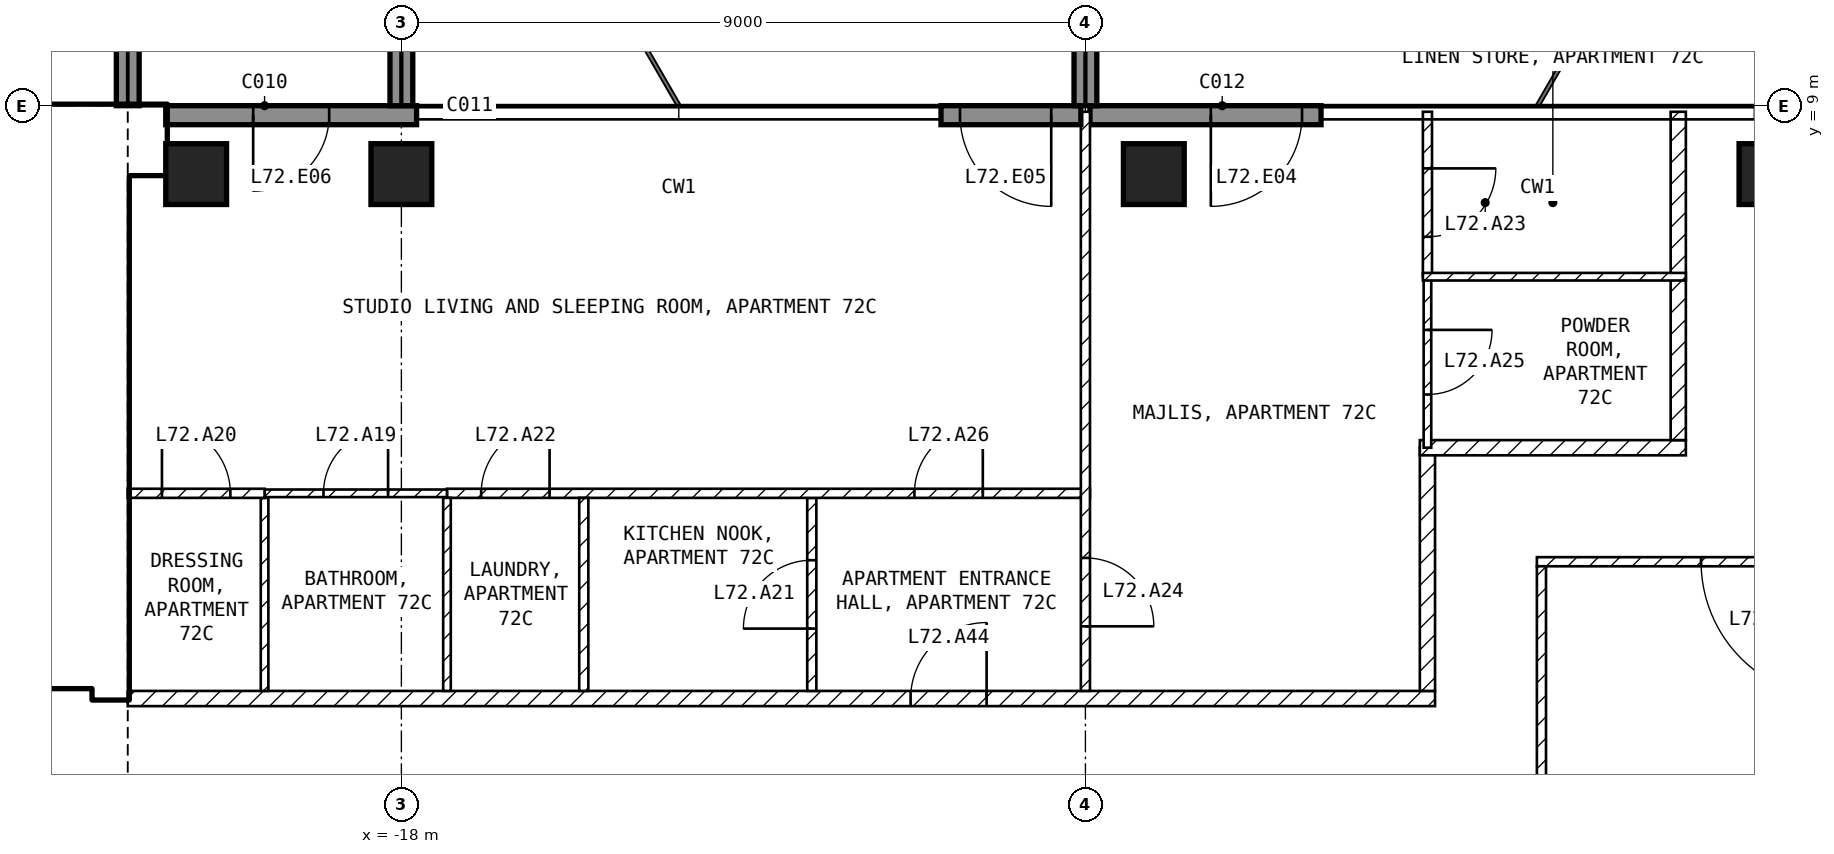
"""IFC4 building model, lengths in metres.
Left out: names, types, materials, properties, quantities, classifications, styles, units other than length and angle.
Written with IfcOpenShell. Run it as: python <this file> out.ifc"""

import sys

from ifc_helpers import new_model, si_unit, direction, frame, frame_2d, origin, origin_2d, place, context, subcontext, project, spatial, rectangle, extrude, element, fill, save


model = new_model("IFC4")
c1 = context("Model", 3, precision=1e-05, world=origin(), true_north=direction((0.0, 1.0)))
c2 = subcontext(c1, "Body", "Model", "MODEL_VIEW")
j1 = project(units=[si_unit("LENGTHUNIT", "METRE"), si_unit("PLANEANGLEUNIT", "RADIAN")], contexts=[c1])
p1 = place(None, origin())
s1 = spatial("IfcSite", under=j1, at=p1, CompositionType="ELEMENT")
p2 = place(p1, origin())
s2 = spatial("IfcBuilding", under=s1, at=p2, CompositionType="ELEMENT")
p3 = place(p2, frame((0.0, 0.0, 281.5)))
s3 = spatial("IfcBuildingStorey", under=s2, at=p3, CompositionType="ELEMENT", Elevation=281.5)
for number, where, z_axis, x_axis in (
    (1, (-20.7, 8.1, -0.25), (0.0, 0.0, 1.0), (1.0, 0.0, 0.0)),
    (2, (-18.0, 8.1, -0.25), (0.0, 0.0, 1.0), (1.0, 0.0, 0.0)),
    (3, (-8.1, 8.1, -0.25), (0.0, 0.0, 1.0), (1.0, 0.0, 0.0)),
    (4, (0.0, 8.1, -0.25), (0.0, 0.0, 1.0), (1.0, 0.0, 0.0)),
):
    element("IfcColumn", number, at=place(p3, frame(where, z_axis=z_axis, x_axis=x_axis)), inside=s3, PredefinedType="COLUMN", context=c2, shape_type="SweptSolid", body=[
        extrude(rectangle(XDim=0.8, YDim=0.8, at=origin_2d()), origin(), (0.0, 0.0, 1.0), 3.45),
    ])
p4 = place(p3, frame((-5.9, 8.875, 0.0), z_axis=(0.0, 0.0, 1.0), x_axis=(-1.0, 0.0, 0.0)))
e5 = element("IfcWall", 5, at=p4, inside=s3, PredefinedType="SOLIDWALL", context=c2, shape_type="SweptSolid", body=[
    extrude(rectangle(XDim=3.04, YDim=0.25, at=frame_2d((1.52, 0.0))), origin(), (0.0, 0.0, 1.0), 3.2),
])
p5 = place(p4, frame((0.25, 0.0, 0.0)))
e6 = element("IfcOpeningElement", 6, at=p5, cuts=e5, PredefinedType="OPENING", context=c2, shape_type="SweptSolid", body=[
    extrude(rectangle(XDim=1.2, YDim=2.4, at=frame_2d((0.6, 1.2))), frame((0.0, 0.135, 0.0), z_axis=(0.0, -1.0, 0.0), x_axis=(1.0, 0.0, 0.0)), (0.0, 0.0, 1.0), 0.27),
])
p6 = place(p3, frame((-9.06, 8.875, 0.0), z_axis=(0.0, 0.0, 1.0), x_axis=(-1.0, 0.0, 0.0)))
e7 = element("IfcWall", 7, at=p6, inside=s3, PredefinedType="SOLIDWALL", context=c2, shape_type="SweptSolid", body=[
    extrude(rectangle(XDim=1.84, YDim=0.25, at=frame_2d((0.92, 0.0))), origin(), (0.0, 0.0, 1.0), 3.2),
])
p7 = place(p6, frame((0.39, 0.0, 0.0)))
e8 = element("IfcOpeningElement", 8, at=p7, cuts=e7, PredefinedType="OPENING", context=c2, shape_type="SweptSolid", body=[
    extrude(rectangle(XDim=1.2, YDim=2.4, at=frame_2d((0.6, 1.2))), frame((0.0, 0.135, 0.0), z_axis=(0.0, -1.0, 0.0), x_axis=(1.0, 0.0, 0.0)), (0.0, 0.0, 1.0), 0.27),
])
p8 = place(p3, frame((-17.8, 8.875, 0.0), z_axis=(0.0, 0.0, 1.0), x_axis=(-1.0, 0.0, 0.0)))
e9 = element("IfcWall", 9, at=p8, inside=s3, PredefinedType="SOLIDWALL", context=c2, shape_type="SweptSolid", body=[
    extrude(rectangle(XDim=3.3, YDim=0.25, at=frame_2d((1.65, 0.0))), origin(), (0.0, 0.0, 1.0), 3.2),
])
p9 = place(p8, frame((1.15, 0.0, 0.0)))
e10 = element("IfcOpeningElement", 10, at=p9, cuts=e9, PredefinedType="OPENING", context=c2, shape_type="SweptSolid", body=[
    extrude(rectangle(XDim=1.0, YDim=2.4, at=frame_2d((0.5, 1.2))), frame((0.0, 0.135, 0.0), z_axis=(0.0, -1.0, 0.0), x_axis=(1.0, 0.0, 0.0)), (0.0, 0.0, 1.0), 0.27),
])
for number, where, z_axis, x_axis in (
    (11, (-21.6, 9.0, 0.0), (0.0, 0.0, 1.0), (0.0, 1.0, 0.0)),
    (12, (-18.0, 9.0, 0.0), (0.0, 0.0, 1.0), (0.0, 1.0, 0.0)),
    (13, (-9.0, 9.0, 0.0), (0.0, 0.0, 1.0), (0.0, 1.0, 0.0)),
):
    element("IfcWall", number, at=place(p3, frame(where, z_axis=z_axis, x_axis=x_axis)), inside=s3, PredefinedType="SOLIDWALL", context=c2, shape_type="SweptSolid", body=[
        extrude(rectangle(XDim=2.7, YDim=0.3, at=frame_2d((1.35, 0.0))), origin(), (0.0, 0.0, 1.0), 3.2),
    ])
p10 = place(p3, frame((-29.75, 8.55, 0.0), z_axis=(0.0, 0.0, 1.0), x_axis=(1.0, 0.0, 0.0)))
e14 = element("IfcWall", 14, at=p10, inside=s3, PredefinedType="SHEAR", context=c2, shape_type="SweptSolid", body=[
    extrude(rectangle(XDim=8.65, YDim=0.9, at=frame_2d((4.325, 0.0))), origin(), (0.0, 0.0, 1.0), 3.2),
])
p11 = place(p3, frame((-21.825, 1.2, 0.0), z_axis=(0.0, 0.0, 1.0), x_axis=(0.0, 1.0, 0.0)))
e15 = element("IfcWall", 15, at=p11, inside=s3, PredefinedType="SHEAR", context=c2, shape_type="SweptSolid", body=[
    extrude(rectangle(XDim=6.9, YDim=0.45, at=frame_2d((3.45, 0.0))), origin(), (0.0, 0.0, 1.0), 3.2),
])
p12 = place(p3, frame((-33.35, 1.45, 0.0), z_axis=(0.0, 0.0, 1.0), x_axis=(1.0, 0.0, 0.0)))
e16 = element("IfcWall", 16, at=p12, inside=s3, PredefinedType="SOLIDWALL", context=c2, shape_type="SweptSolid", body=[
    extrude(rectangle(XDim=11.3, YDim=0.2, at=frame_2d((5.65, 0.0))), origin(), (0.0, 0.0, 1.0), 3.2),
])
p13 = place(p12, frame((9.55, 0.0, 0.0)))
e17 = element("IfcOpeningElement", 17, at=p13, cuts=e16, PredefinedType="OPENING", context=c2, shape_type="SweptSolid", body=[
    extrude(rectangle(XDim=1.0, YDim=2.1, at=frame_2d((0.5, 1.05))), frame((0.0, 0.11, 0.0), z_axis=(0.0, -1.0, 0.0), x_axis=(1.0, 0.0, 0.0)), (0.0, 0.0, 1.0), 0.22),
])
p14 = place(p12, frame((7.05, 0.0, 0.0)))
e18 = element("IfcOpeningElement", 18, at=p14, cuts=e16, PredefinedType="OPENING", context=c2, shape_type="SweptSolid", body=[
    extrude(rectangle(XDim=1.0, YDim=2.1, at=frame_2d((0.5, 1.05))), frame((0.0, 0.11, 0.0), z_axis=(0.0, -1.0, 0.0), x_axis=(1.0, 0.0, 0.0)), (0.0, 0.0, 1.0), 0.22),
])
p15 = place(p12, frame((1.175, 0.0, 0.0)))
e19 = element("IfcOpeningElement", 19, at=p15, cuts=e16, PredefinedType="OPENING", context=c2, shape_type="SweptSolid", body=[
    extrude(rectangle(XDim=0.9, YDim=2.1, at=frame_2d((0.45, 1.05))), frame((0.0, 0.11, 0.0), z_axis=(0.0, -1.0, 0.0), x_axis=(1.0, 0.0, 0.0)), (0.0, 0.0, 1.0), 0.22),
])
p16 = place(p3, frame((-28.35, 5.15, 0.0), z_axis=(0.0, 0.0, 1.0), x_axis=(1.0, 0.0, 0.0)))
e20 = element("IfcWall", 20, at=p16, inside=s3, PredefinedType="SOLIDWALL", context=c2, shape_type="SweptSolid", body=[
    extrude(rectangle(XDim=6.3, YDim=0.2, at=frame_2d((3.15, 0.0))), origin(), (0.0, 0.0, 1.0), 3.2),
])
p17 = place(p16, frame((5.1, 0.0, 0.0)))
e21 = element("IfcOpeningElement", 21, at=p17, cuts=e20, PredefinedType="OPENING", context=c2, shape_type="SweptSolid", body=[
    extrude(rectangle(XDim=1.0, YDim=2.1, at=frame_2d((0.5, 1.05))), frame((0.0, 0.11, 0.0), z_axis=(0.0, -1.0, 0.0), x_axis=(1.0, 0.0, 0.0)), (0.0, 0.0, 1.0), 0.22),
])
p18 = place(p3, frame((3.06, 3.0, 0.0), z_axis=(0.0, 0.0, 1.0), x_axis=(-1.0, 0.0, 0.0)))
e22 = element("IfcWall", 22, at=p18, inside=s3, PredefinedType="PARTITIONING", context=c2, shape_type="SweptSolid", body=[
    extrude(rectangle(XDim=6.12, YDim=0.12, at=frame_2d((3.06, 0.0))), origin(), (0.0, 0.0, 1.0), 3.2),
])
p19 = place(p18, frame((2.16, 0.0, 0.0)))
e23 = element("IfcOpeningElement", 23, at=p19, cuts=e22, PredefinedType="OPENING", context=c2, shape_type="SweptSolid", body=[
    extrude(rectangle(XDim=1.8, YDim=2.1, at=frame_2d((0.9, 1.05))), frame((0.0, 0.07, 0.0), z_axis=(0.0, -1.0, 0.0), x_axis=(1.0, 0.0, 0.0)), (0.0, 0.0, 1.0), 0.14),
])
p20 = place(p3, frame((-3.0, 2.94, 0.0), z_axis=(0.0, 0.0, 1.0), x_axis=(0.0, -1.0, 0.0)))
e24 = element("IfcWall", 24, at=p20, inside=s3, PredefinedType="PARTITIONING", context=c2, shape_type="SweptSolid", body=[
    extrude(rectangle(XDim=5.88, YDim=0.12, at=frame_2d((2.94, 0.0))), origin(), (0.0, 0.0, 1.0), 3.2),
])
p21 = place(p3, frame((-21.6, 1.2, 0.0), z_axis=(0.0, 0.0, 1.0), x_axis=(1.0, 0.0, 0.0)))
e25 = element("IfcWall", 25, at=p21, inside=s3, PredefinedType="PARTITIONING", context=c2, shape_type="SweptSolid", body=[
    extrude(rectangle(XDim=17.2, YDim=0.2, at=frame_2d((8.6, 0.0))), origin(), (0.0, 0.0, 1.0), 3.2),
])
p22 = place(p21, frame((10.3, 0.0, 0.0)))
e26 = element("IfcOpeningElement", 26, at=p22, cuts=e25, PredefinedType="OPENING", context=c2, shape_type="SweptSolid", body=[
    extrude(rectangle(XDim=1.0, YDim=2.1, at=frame_2d((0.5, 1.05))), frame((0.0, 0.11, 0.0), z_axis=(0.0, -1.0, 0.0), x_axis=(1.0, 0.0, 0.0)), (0.0, 0.0, 1.0), 0.22),
])
p23 = place(p3, frame((-4.5, 1.3, 0.0), z_axis=(0.0, 0.0, 1.0), x_axis=(0.0, 1.0, 0.0)))
e27 = element("IfcWall", 27, at=p23, inside=s3, PredefinedType="PARTITIONING", context=c2, shape_type="SweptSolid", body=[
    extrude(rectangle(XDim=3.2, YDim=0.2, at=frame_2d((1.6, 0.0))), origin(), (0.0, 0.0, 1.0), 3.2),
])
p24 = place(p3, frame((-4.6, 4.5, 0.0), z_axis=(0.0, 0.0, 1.0), x_axis=(1.0, 0.0, 0.0)))
e28 = element("IfcWall", 28, at=p24, inside=s3, PredefinedType="PARTITIONING", context=c2, shape_type="SweptSolid", body=[
    extrude(rectangle(XDim=3.5, YDim=0.2, at=frame_2d((1.75, 0.0))), origin(), (0.0, 0.0, 1.0), 3.2),
])
p25 = place(p3, frame((-1.2, 4.6, 0.0), z_axis=(0.0, 0.0, 1.0), x_axis=(0.0, 1.0, 0.0)))
e29 = element("IfcWall", 29, at=p25, inside=s3, PredefinedType="PARTITIONING", context=c2, shape_type="SweptSolid", body=[
    extrude(rectangle(XDim=4.32, YDim=0.2, at=frame_2d((2.16, 0.0))), origin(), (0.0, 0.0, 1.0), 3.2),
])
p26 = place(p3, frame((-12.6, 1.3, 0.0), z_axis=(0.0, 0.0, 1.0), x_axis=(0.0, 1.0, 0.0)))
e30 = element("IfcWall", 30, at=p26, inside=s3, PredefinedType="PARTITIONING", context=c2, shape_type="SweptSolid", body=[
    extrude(rectangle(XDim=2.54, YDim=0.12, at=frame_2d((1.27, 0.0))), origin(), (0.0, 0.0, 1.0), 3.2),
])
p27 = place(p26, frame((0.82, 0.0, 0.0)))
e31 = element("IfcOpeningElement", 31, at=p27, cuts=e30, PredefinedType="OPENING", context=c2, shape_type="SweptSolid", body=[
    extrude(rectangle(XDim=0.9, YDim=2.1, at=frame_2d((0.45, 1.05))), frame((0.0, 0.07, 0.0), z_axis=(0.0, -1.0, 0.0), x_axis=(1.0, 0.0, 0.0)), (0.0, 0.0, 1.0), 0.14),
])
p28 = place(p3, frame((-17.4, 3.9, 0.0), z_axis=(0.0, 0.0, 1.0), x_axis=(1.0, 0.0, 0.0)))
e32 = element("IfcWall", 32, at=p28, inside=s3, PredefinedType="PARTITIONING", context=c2, shape_type="SweptSolid", body=[
    extrude(rectangle(XDim=8.46, YDim=0.12, at=frame_2d((4.23, 0.0))), origin(), (0.0, 0.0, 1.0), 3.2),
])
p29 = place(p28, frame((0.45, 0.0, 0.0)))
e33 = element("IfcOpeningElement", 33, at=p29, cuts=e32, PredefinedType="OPENING", context=c2, shape_type="SweptSolid", body=[
    extrude(rectangle(XDim=0.9, YDim=2.1, at=frame_2d((0.45, 1.05))), frame((0.0, 0.07, 0.0), z_axis=(0.0, -1.0, 0.0), x_axis=(1.0, 0.0, 0.0)), (0.0, 0.0, 1.0), 0.14),
])
p30 = place(p28, frame((6.15, 0.0, 0.0)))
e34 = element("IfcOpeningElement", 34, at=p30, cuts=e32, PredefinedType="OPENING", context=c2, shape_type="SweptSolid", body=[
    extrude(rectangle(XDim=0.9, YDim=2.1, at=frame_2d((0.45, 1.05))), frame((0.0, 0.07, 0.0), z_axis=(0.0, -1.0, 0.0), x_axis=(1.0, 0.0, 0.0)), (0.0, 0.0, 1.0), 0.14),
])
p31 = place(p3, frame((-9.0, 8.92, 0.0), z_axis=(0.0, 0.0, 1.0), x_axis=(0.0, -1.0, 0.0)))
e35 = element("IfcWall", 35, at=p31, inside=s3, PredefinedType="PARTITIONING", context=c2, shape_type="SweptSolid", body=[
    extrude(rectangle(XDim=7.62, YDim=0.12, at=frame_2d((3.81, 0.0))), origin(), (0.0, 0.0, 1.0), 3.2),
])
p32 = place(p31, frame((5.87, 0.0, 0.0)))
e36 = element("IfcOpeningElement", 36, at=p32, cuts=e35, PredefinedType="OPENING", context=c2, shape_type="SweptSolid", body=[
    extrude(rectangle(XDim=0.9, YDim=2.1, at=frame_2d((0.45, 1.05))), frame((0.0, 0.07, 0.0), z_axis=(0.0, -1.0, 0.0), x_axis=(1.0, 0.0, 0.0)), (0.0, 0.0, 1.0), 0.14),
])
p33 = place(p3, frame((-15.6, 1.3, 0.0), z_axis=(0.0, 0.0, 1.0), x_axis=(0.0, 1.0, 0.0)))
e37 = element("IfcWall", 37, at=p33, inside=s3, PredefinedType="PARTITIONING", context=c2, shape_type="SweptSolid", body=[
    extrude(rectangle(XDim=2.54, YDim=0.12, at=frame_2d((1.27, 0.0))), origin(), (0.0, 0.0, 1.0), 3.2),
])
for number, where, z_axis, x_axis in (
    (38, (-17.4, 1.3, 0.0), (0.0, 0.0, 1.0), (0.0, 1.0, 0.0)),
    (39, (-19.8, 1.3, 0.0), (0.0, 0.0, 1.0), (0.0, 1.0, 0.0)),
):
    element("IfcWall", number, at=place(p3, frame(where, z_axis=z_axis, x_axis=x_axis)), inside=s3, PredefinedType="PARTITIONING", context=c2, shape_type="SweptSolid", body=[
        extrude(rectangle(XDim=2.54, YDim=0.1, at=frame_2d((1.27, 0.0))), origin(), (0.0, 0.0, 1.0), 3.2),
    ])
p34 = place(p3, frame((-19.8, 3.9, 0.0), z_axis=(0.0, 0.0, 1.0), x_axis=(1.0, 0.0, 0.0)))
e40 = element("IfcWall", 40, at=p34, inside=s3, PredefinedType="PARTITIONING", context=c2, shape_type="SweptSolid", body=[
    extrude(rectangle(XDim=2.4, YDim=0.1, at=frame_2d((1.2, 0.0))), origin(), (0.0, 0.0, 1.0), 3.2),
])
p35 = place(p34, frame((0.775, 0.0, 0.0)))
e41 = element("IfcOpeningElement", 41, at=p35, cuts=e40, PredefinedType="OPENING", context=c2, shape_type="SweptSolid", body=[
    extrude(rectangle(XDim=0.85, YDim=2.1, at=frame_2d((0.425, 1.05))), frame((0.0, 0.06, 0.0), z_axis=(0.0, -1.0, 0.0), x_axis=(1.0, 0.0, 0.0)), (0.0, 0.0, 1.0), 0.12),
])
p36 = place(p3, frame((-21.6, 3.9, 0.0), z_axis=(0.0, 0.0, 1.0), x_axis=(1.0, 0.0, 0.0)))
e42 = element("IfcWall", 42, at=p36, inside=s3, PredefinedType="PARTITIONING", context=c2, shape_type="SweptSolid", body=[
    extrude(rectangle(XDim=1.8, YDim=0.12, at=frame_2d((0.9, 0.0))), origin(), (0.0, 0.0, 1.0), 3.2),
])
p37 = place(p36, frame((0.45, 0.0, 0.0)))
e43 = element("IfcOpeningElement", 43, at=p37, cuts=e42, PredefinedType="OPENING", context=c2, shape_type="SweptSolid", body=[
    extrude(rectangle(XDim=0.9, YDim=2.1, at=frame_2d((0.45, 1.05))), frame((0.0, 0.07, 0.0), z_axis=(0.0, -1.0, 0.0), x_axis=(1.0, 0.0, 0.0)), (0.0, 0.0, 1.0), 0.14),
])
p38 = place(p3, frame((-4.5, 6.75, 0.0), z_axis=(0.0, 0.0, 1.0), x_axis=(0.0, -1.0, 0.0)))
e44 = element("IfcWall", 44, at=p38, inside=s3, PredefinedType="PARTITIONING", context=c2, shape_type="SweptSolid", body=[
    extrude(rectangle(XDim=2.25, YDim=0.1, at=frame_2d((1.125, 0.0))), origin(), (0.0, 0.0, 1.0), 3.2),
])
p39 = place(p38, frame((0.7, 0.0, 0.0)))
e45 = element("IfcOpeningElement", 45, at=p39, cuts=e44, PredefinedType="OPENING", context=c2, shape_type="SweptSolid", body=[
    extrude(rectangle(XDim=0.85, YDim=2.1, at=frame_2d((0.425, 1.05))), frame((0.0, 0.06, 0.0), z_axis=(0.0, -1.0, 0.0), x_axis=(1.0, 0.0, 0.0)), (0.0, 0.0, 1.0), 0.12),
])
p40 = place(p3, frame((-4.5, 8.92, 0.0), z_axis=(0.0, 0.0, 1.0), x_axis=(0.0, -1.0, 0.0)))
e46 = element("IfcWall", 46, at=p40, inside=s3, PredefinedType="PARTITIONING", context=c2, shape_type="SweptSolid", body=[
    extrude(rectangle(XDim=2.17, YDim=0.12, at=frame_2d((1.085, 0.0))), origin(), (0.0, 0.0, 1.0), 3.2),
])
p41 = place(p40, frame((0.745, 0.0, 0.0)))
e47 = element("IfcOpeningElement", 47, at=p41, cuts=e46, PredefinedType="OPENING", context=c2, shape_type="SweptSolid", body=[
    extrude(rectangle(XDim=0.9, YDim=2.1, at=frame_2d((0.45, 1.05))), frame((0.0, 0.07, 0.0), z_axis=(0.0, -1.0, 0.0), x_axis=(1.0, 0.0, 0.0)), (0.0, 0.0, 1.0), 0.14),
])
p42 = place(p3, frame((-4.56, 6.75, 0.0), z_axis=(0.0, 0.0, 1.0), x_axis=(1.0, 0.0, 0.0)))
e48 = element("IfcWall", 48, at=p42, inside=s3, PredefinedType="PARTITIONING", context=c2, shape_type="SweptSolid", body=[
    extrude(rectangle(XDim=3.46, YDim=0.1, at=frame_2d((1.73, 0.0))), origin(), (0.0, 0.0, 1.0), 3.2),
])
p43 = place(p5, origin())
e49 = element("IfcDoor", 49, at=p43, inside=s3, OperationType="SINGLE_SWING_RIGHT", PredefinedType="DOOR", context=c2, shape_type="SweptSolid", body=[
    extrude(rectangle(XDim=1.2, YDim=2.4, at=frame_2d((0.6, 1.2))), frame((0.0, 0.025, 0.0), z_axis=(0.0, -1.0, 0.0), x_axis=(1.0, 0.0, 0.0)), (0.0, 0.0, 1.0), 0.05),
])
fill(e6, e49)
p44 = place(p7, origin())
e50 = element("IfcDoor", 50, at=p44, inside=s3, OperationType="SINGLE_SWING_LEFT", PredefinedType="DOOR", context=c2, shape_type="SweptSolid", body=[
    extrude(rectangle(XDim=1.2, YDim=2.4, at=frame_2d((0.6, 1.2))), frame((0.0, 0.025, 0.0), z_axis=(0.0, -1.0, 0.0), x_axis=(1.0, 0.0, 0.0)), (0.0, 0.0, 1.0), 0.05),
])
fill(e8, e50)
p45 = place(p9, origin())
e51 = element("IfcDoor", 51, at=p45, inside=s3, OperationType="SINGLE_SWING_RIGHT", PredefinedType="DOOR", context=c2, shape_type="SweptSolid", body=[
    extrude(rectangle(XDim=1.0, YDim=2.4, at=frame_2d((0.5, 1.2))), frame((0.0, 0.025, 0.0), z_axis=(0.0, -1.0, 0.0), x_axis=(1.0, 0.0, 0.0)), (0.0, 0.0, 1.0), 0.05),
])
fill(e10, e51)
p46 = place(p17, origin())
e52 = element("IfcDoor", 52, at=p46, inside=s3, OperationType="SINGLE_SWING_LEFT", PredefinedType="DOOR", context=c2, shape_type="SweptSolid", body=[
    extrude(rectangle(XDim=1.0, YDim=2.1, at=frame_2d((0.5, 1.05))), frame((0.0, 0.025, 0.0), z_axis=(0.0, -1.0, 0.0), x_axis=(1.0, 0.0, 0.0)), (0.0, 0.0, 1.0), 0.05),
])
fill(e21, e52)
p47 = place(p19, origin())
e53 = element("IfcDoor", 53, at=p47, inside=s3, OperationType="SINGLE_SWING_LEFT", PredefinedType="DOOR", context=c2, shape_type="SweptSolid", body=[
    extrude(rectangle(XDim=1.8, YDim=2.1, at=frame_2d((0.9, 1.05))), frame((0.0, 0.025, 0.0), z_axis=(0.0, -1.0, 0.0), x_axis=(1.0, 0.0, 0.0)), (0.0, 0.0, 1.0), 0.05),
])
fill(e23, e53)
p48 = place(p35, origin())
e54 = element("IfcDoor", 54, at=p48, inside=s3, OperationType="SINGLE_SWING_RIGHT", PredefinedType="DOOR", context=c2, shape_type="SweptSolid", body=[
    extrude(rectangle(XDim=0.85, YDim=2.1, at=frame_2d((0.425, 1.05))), frame((0.0, 0.025, 0.0), z_axis=(0.0, -1.0, 0.0), x_axis=(1.0, 0.0, 0.0)), (0.0, 0.0, 1.0), 0.05),
])
fill(e41, e54)
p49 = place(p37, origin())
e55 = element("IfcDoor", 55, at=p49, inside=s3, OperationType="SINGLE_SWING_LEFT", PredefinedType="DOOR", context=c2, shape_type="SweptSolid", body=[
    extrude(rectangle(XDim=0.9, YDim=2.1, at=frame_2d((0.45, 1.05))), frame((0.0, 0.025, 0.0), z_axis=(0.0, -1.0, 0.0), x_axis=(1.0, 0.0, 0.0)), (0.0, 0.0, 1.0), 0.05),
])
fill(e43, e55)
p50 = place(p27, origin())
e56 = element("IfcDoor", 56, at=p50, inside=s3, OperationType="SINGLE_SWING_LEFT", PredefinedType="DOOR", context=c2, shape_type="SweptSolid", body=[
    extrude(rectangle(XDim=0.9, YDim=2.1, at=frame_2d((0.45, 1.05))), frame((0.0, 0.025, 0.0), z_axis=(0.0, -1.0, 0.0), x_axis=(1.0, 0.0, 0.0)), (0.0, 0.0, 1.0), 0.05),
])
fill(e31, e56)
p51 = place(p29, origin())
e57 = element("IfcDoor", 57, at=p51, inside=s3, OperationType="SINGLE_SWING_RIGHT", PredefinedType="DOOR", context=c2, shape_type="SweptSolid", body=[
    extrude(rectangle(XDim=0.9, YDim=2.1, at=frame_2d((0.45, 1.05))), frame((0.0, 0.025, 0.0), z_axis=(0.0, -1.0, 0.0), x_axis=(1.0, 0.0, 0.0)), (0.0, 0.0, 1.0), 0.05),
])
fill(e33, e57)
p52 = place(p41, origin())
e58 = element("IfcDoor", 58, at=p52, inside=s3, OperationType="SINGLE_SWING_LEFT", PredefinedType="DOOR", context=c2, shape_type="SweptSolid", body=[
    extrude(rectangle(XDim=0.9, YDim=2.1, at=frame_2d((0.45, 1.05))), frame((0.0, 0.025, 0.0), z_axis=(0.0, -1.0, 0.0), x_axis=(1.0, 0.0, 0.0)), (0.0, 0.0, 1.0), 0.05),
])
fill(e47, e58)
p53 = place(p32, origin())
e59 = element("IfcDoor", 59, at=p53, inside=s3, OperationType="SINGLE_SWING_RIGHT", PredefinedType="DOOR", context=c2, shape_type="SweptSolid", body=[
    extrude(rectangle(XDim=0.9, YDim=2.1, at=frame_2d((0.45, 1.05))), frame((0.0, 0.025, 0.0), z_axis=(0.0, -1.0, 0.0), x_axis=(1.0, 0.0, 0.0)), (0.0, 0.0, 1.0), 0.05),
])
fill(e36, e59)
p54 = place(p39, origin())
e60 = element("IfcDoor", 60, at=p54, inside=s3, OperationType="SINGLE_SWING_LEFT", PredefinedType="DOOR", context=c2, shape_type="SweptSolid", body=[
    extrude(rectangle(XDim=0.85, YDim=2.1, at=frame_2d((0.425, 1.05))), frame((0.0, 0.025, 0.0), z_axis=(0.0, -1.0, 0.0), x_axis=(1.0, 0.0, 0.0)), (0.0, 0.0, 1.0), 0.05),
])
fill(e45, e60)
p55 = place(p30, origin())
e61 = element("IfcDoor", 61, at=p55, inside=s3, OperationType="SINGLE_SWING_RIGHT", PredefinedType="DOOR", context=c2, shape_type="SweptSolid", body=[
    extrude(rectangle(XDim=0.9, YDim=2.1, at=frame_2d((0.45, 1.05))), frame((0.0, 0.025, 0.0), z_axis=(0.0, -1.0, 0.0), x_axis=(1.0, 0.0, 0.0)), (0.0, 0.0, 1.0), 0.05),
])
fill(e34, e61)
p56 = place(p22, origin())
e62 = element("IfcDoor", 62, at=p56, inside=s3, OperationType="SINGLE_SWING_RIGHT", PredefinedType="DOOR", context=c2, shape_type="SweptSolid", body=[
    extrude(rectangle(XDim=1.0, YDim=2.1, at=frame_2d((0.5, 1.05))), frame((0.0, 0.025, 0.0), z_axis=(0.0, -1.0, 0.0), x_axis=(1.0, 0.0, 0.0)), (0.0, 0.0, 1.0), 0.05),
])
fill(e26, e62)
save(model, sys.argv[1])
